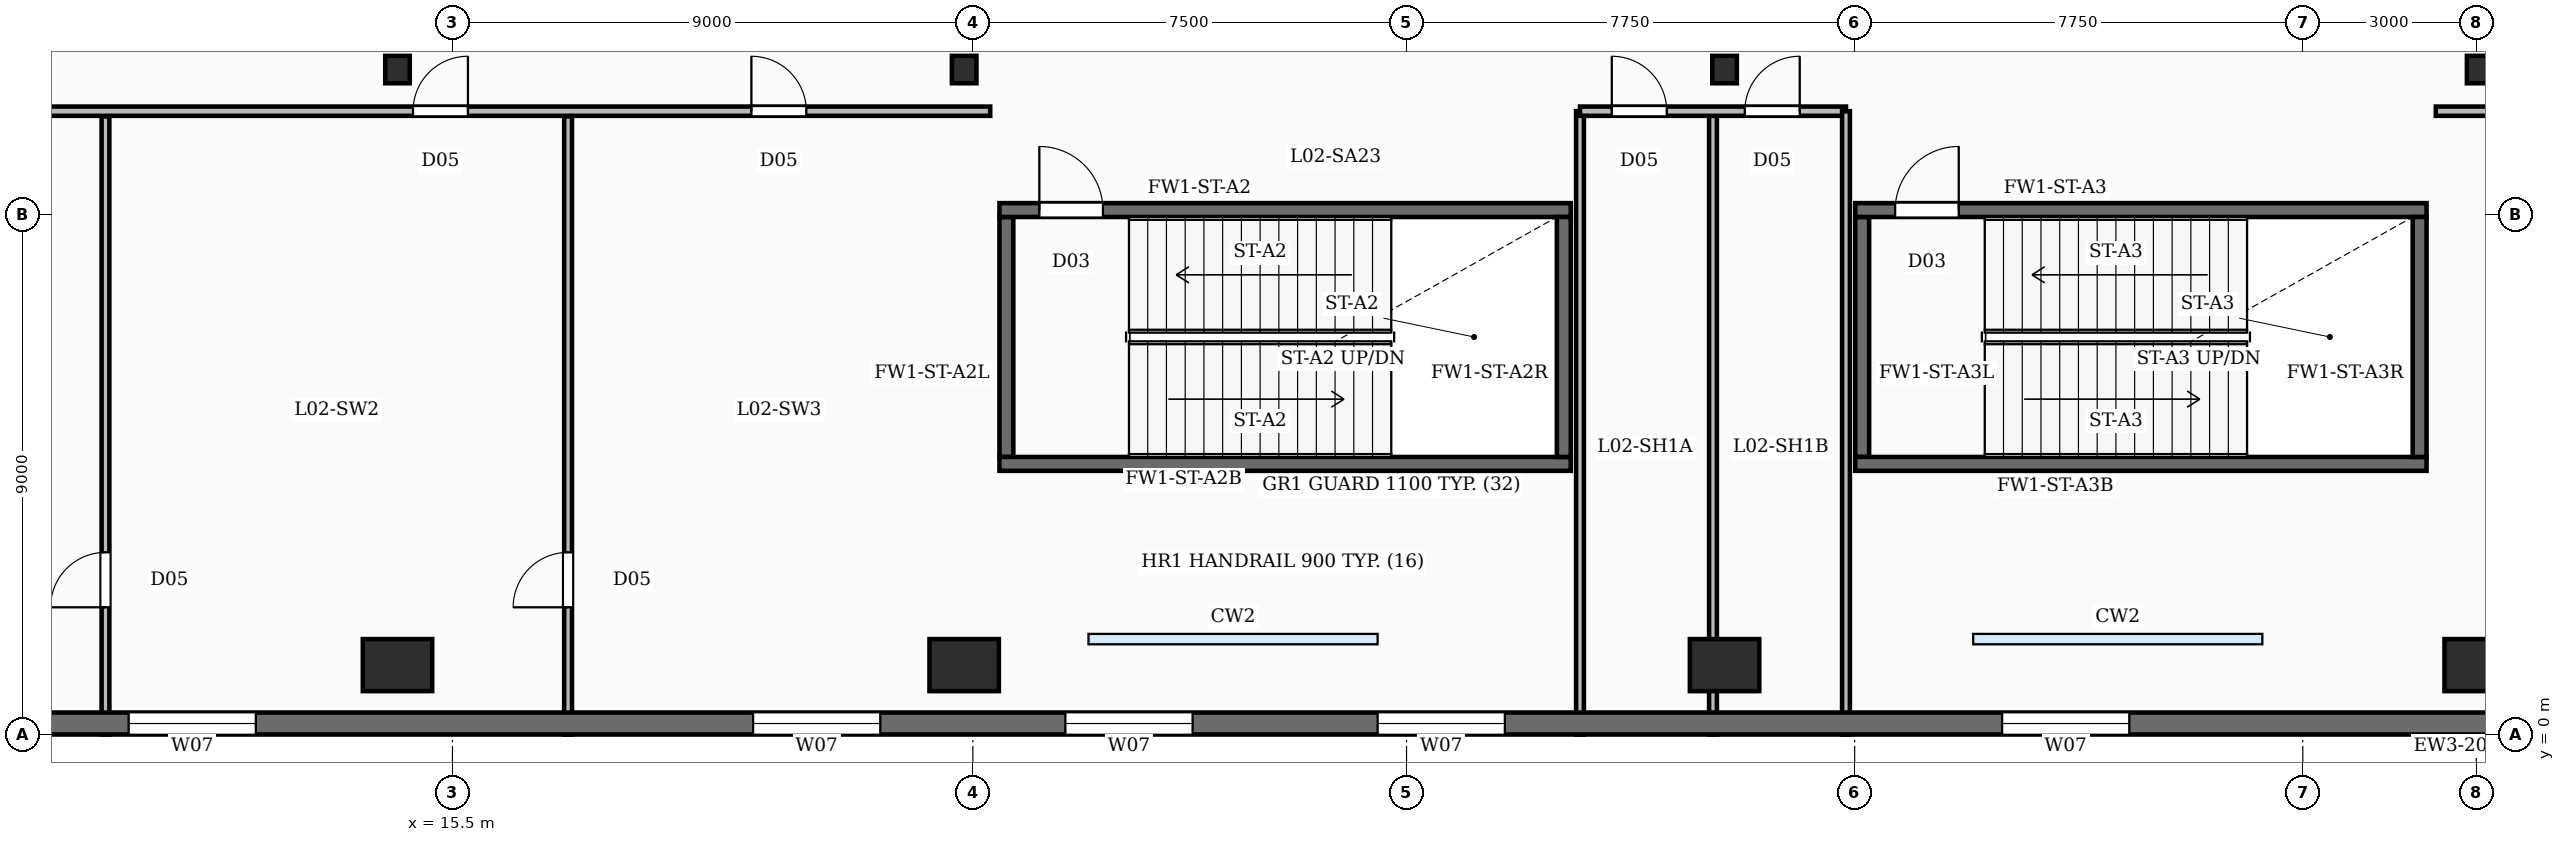
"""IFC4 building model, lengths in metres.
Left out: names, types, materials, properties, quantities, classifications, styles, units other than length and angle.
Written with IfcOpenShell. Run it as: python <this file> out.ifc"""

import sys

from ifc_helpers import new_model, si_unit, direction, frame, frame_2d, origin, origin_2d, place, context, subcontext, project, spatial, rectangle, i_section, extrude, element, fill, save


model = new_model("IFC4")
c1 = context("Model", 3, precision=1e-05, world=origin(), true_north=direction((0.0, 1.0)))
c2 = subcontext(c1, "Body", "Model", "MODEL_VIEW")
j1 = project(units=[si_unit("LENGTHUNIT", "METRE"), si_unit("PLANEANGLEUNIT", "RADIAN")], contexts=[c1])
p1 = place(None, origin())
s1 = spatial("IfcSite", under=j1, at=p1, CompositionType="ELEMENT")
p2 = place(p1, origin())
s2 = spatial("IfcBuilding", under=s1, at=p2, CompositionType="ELEMENT")
p3 = place(p2, frame((0.0, 0.0, 13.0)))
s3 = spatial("IfcBuildingStorey", under=s2, at=p3, CompositionType="ELEMENT", Elevation=13.0)
for number, where, z_axis, x_axis in (
    (1, (14.55, 1.2, -0.35), (0.0, 0.0, 1.0), (1.0, 0.0, 0.0)),
    (2, (24.35, 1.2, -0.35), (0.0, 0.0, 1.0), (1.0, 0.0, 0.0)),
    (3, (37.5, 1.2, -0.35), (0.0, 0.0, 1.0), (1.0, 0.0, 0.0)),
    (4, (50.55, 1.2, -0.35), (0.0, 0.0, 1.0), (1.0, 0.0, 0.0)),
):
    element("IfcColumn", number, at=place(p3, frame(where, z_axis=z_axis, x_axis=x_axis)), inside=s3, PredefinedType="COLUMN", context=c2, shape_type="SweptSolid", body=[
        extrude(rectangle(XDim=1.2, YDim=0.9, at=origin_2d()), origin(), (0.0, 0.0, 1.0), 5.0),
    ])
for number, where, z_axis, x_axis in (
    (5, (14.55, 11.5, -0.35), (0.0, 0.0, 1.0), (1.0, 0.0, 0.0)),
    (6, (24.35, 11.5, -0.35), (0.0, 0.0, 1.0), (1.0, 0.0, 0.0)),
    (7, (37.5, 11.5, -0.35), (0.0, 0.0, 1.0), (1.0, 0.0, 0.0)),
    (8, (50.55, 11.5, -0.35), (0.0, 0.0, 1.0), (1.0, 0.0, 0.0)),
):
    element("IfcColumn", number, at=place(p3, frame(where, z_axis=z_axis, x_axis=x_axis)), inside=s3, PredefinedType="COLUMN", context=c2, shape_type="SweptSolid", body=[
        extrude(i_section(OverallWidth=0.424, OverallDepth=0.474, WebThickness=0.048, FlangeThickness=0.077, FilletRadius=0.02, at=origin_2d()), origin(), (0.0, 0.0, 1.0), 5.0),
    ])
p4 = place(p3, frame((74.1, 0.19, 0.0), z_axis=(0.0, 0.0, 1.0), x_axis=(-1.0, 0.0, 0.0)))
e9 = element("IfcWall", 9, at=p4, inside=s3, PredefinedType="SOLIDWALL", context=c2, shape_type="SweptSolid", body=[
    extrude(rectangle(XDim=68.7, YDim=0.38, at=frame_2d((34.35, 0.0))), origin(), (0.0, 0.0, 1.0), 4.65),
])
p5 = place(p4, frame((2.6, 0.0, 0.95)))
e10 = element("IfcOpeningElement", 10, at=p5, cuts=e9, PredefinedType="OPENING", context=c2, shape_type="SweptSolid", body=[
    extrude(rectangle(XDim=2.2, YDim=2.5, at=frame_2d((1.1, 1.25))), frame((0.0, 0.2, 0.0), z_axis=(0.0, -1.0, 0.0), x_axis=(1.0, 0.0, 0.0)), (0.0, 0.0, 1.0), 0.4),
])
p6 = place(p4, frame((18.8, 0.0, 0.95)))
e11 = element("IfcOpeningElement", 11, at=p6, cuts=e9, PredefinedType="OPENING", context=c2, shape_type="SweptSolid", body=[
    extrude(rectangle(XDim=2.2, YDim=2.5, at=frame_2d((1.1, 1.25))), frame((0.0, 0.2, 0.0), z_axis=(0.0, -1.0, 0.0), x_axis=(1.0, 0.0, 0.0)), (0.0, 0.0, 1.0), 0.4),
])
p7 = place(p4, frame((29.6, 0.0, 0.95)))
e12 = element("IfcOpeningElement", 12, at=p7, cuts=e9, PredefinedType="OPENING", context=c2, shape_type="SweptSolid", body=[
    extrude(rectangle(XDim=2.2, YDim=2.5, at=frame_2d((1.1, 1.25))), frame((0.0, 0.2, 0.0), z_axis=(0.0, -1.0, 0.0), x_axis=(1.0, 0.0, 0.0)), (0.0, 0.0, 1.0), 0.4),
])
p8 = place(p4, frame((40.4, 0.0, 0.95)))
e13 = element("IfcOpeningElement", 13, at=p8, cuts=e9, PredefinedType="OPENING", context=c2, shape_type="SweptSolid", body=[
    extrude(rectangle(XDim=2.2, YDim=2.5, at=frame_2d((1.1, 1.25))), frame((0.0, 0.2, 0.0), z_axis=(0.0, -1.0, 0.0), x_axis=(1.0, 0.0, 0.0)), (0.0, 0.0, 1.0), 0.4),
])
p9 = place(p4, frame((45.8, 0.0, 0.95)))
e14 = element("IfcOpeningElement", 14, at=p9, cuts=e9, PredefinedType="OPENING", context=c2, shape_type="SweptSolid", body=[
    extrude(rectangle(XDim=2.2, YDim=2.5, at=frame_2d((1.1, 1.25))), frame((0.0, 0.2, 0.0), z_axis=(0.0, -1.0, 0.0), x_axis=(1.0, 0.0, 0.0)), (0.0, 0.0, 1.0), 0.4),
])
p10 = place(p4, frame((51.2, 0.0, 0.95)))
e15 = element("IfcOpeningElement", 15, at=p10, cuts=e9, PredefinedType="OPENING", context=c2, shape_type="SweptSolid", body=[
    extrude(rectangle(XDim=2.2, YDim=2.5, at=frame_2d((1.1, 1.25))), frame((0.0, 0.2, 0.0), z_axis=(0.0, -1.0, 0.0), x_axis=(1.0, 0.0, 0.0)), (0.0, 0.0, 1.0), 0.4),
])
p11 = place(p4, frame((62.0, 0.0, 0.95)))
e16 = element("IfcOpeningElement", 16, at=p11, cuts=e9, PredefinedType="OPENING", context=c2, shape_type="SweptSolid", body=[
    extrude(rectangle(XDim=2.2, YDim=2.5, at=frame_2d((1.1, 1.25))), frame((0.0, 0.2, 0.0), z_axis=(0.0, -1.0, 0.0), x_axis=(1.0, 0.0, 0.0)), (0.0, 0.0, 1.0), 0.4),
])
p12 = place(p3, frame((24.96, 9.07, 0.0), z_axis=(0.0, 0.0, 1.0), x_axis=(1.0, 0.0, 0.0)))
e17 = element("IfcWall", 17, at=p12, inside=s3, PredefinedType="SOLIDWALL", context=c2, shape_type="SweptSolid", body=[
    extrude(rectangle(XDim=9.88, YDim=0.24, at=frame_2d((4.94, 0.0))), origin(), (0.0, 0.0, 1.0), 4.65),
])
p13 = place(p12, frame((0.69, 0.0, 0.0)))
e18 = element("IfcOpeningElement", 18, at=p13, cuts=e17, PredefinedType="OPENING", context=c2, shape_type="SweptSolid", body=[
    extrude(rectangle(XDim=1.1, YDim=2.15, at=frame_2d((0.55, 1.075))), frame((0.0, 0.13, 0.0), z_axis=(0.0, -1.0, 0.0), x_axis=(1.0, 0.0, 0.0)), (0.0, 0.0, 1.0), 0.26),
])
p14 = place(p3, frame((24.96, 4.68, 0.0), z_axis=(0.0, 0.0, 1.0), x_axis=(1.0, 0.0, 0.0)))
e19 = element("IfcWall", 19, at=p14, inside=s3, PredefinedType="SOLIDWALL", context=c2, shape_type="SweptSolid", body=[
    extrude(rectangle(XDim=9.88, YDim=0.24, at=frame_2d((4.94, 0.0))), origin(), (0.0, 0.0, 1.0), 4.65),
])
for number, where, z_axis, x_axis in (
    (20, (25.08, 4.8, 0.0), (0.0, 0.0, 1.0), (0.0, 1.0, 0.0)),
    (21, (34.72, 4.8, 0.0), (0.0, 0.0, 1.0), (0.0, 1.0, 0.0)),
):
    element("IfcWall", number, at=place(p3, frame(where, z_axis=z_axis, x_axis=x_axis)), inside=s3, PredefinedType="SOLIDWALL", context=c2, shape_type="SweptSolid", body=[
        extrude(rectangle(XDim=4.15, YDim=0.24, at=frame_2d((2.075, 0.0))), origin(), (0.0, 0.0, 1.0), 4.65),
    ])
p15 = place(p3, frame((39.76, 9.07, 0.0), z_axis=(0.0, 0.0, 1.0), x_axis=(1.0, 0.0, 0.0)))
e22 = element("IfcWall", 22, at=p15, inside=s3, PredefinedType="SOLIDWALL", context=c2, shape_type="SweptSolid", body=[
    extrude(rectangle(XDim=9.88, YDim=0.24, at=frame_2d((4.94, 0.0))), origin(), (0.0, 0.0, 1.0), 4.65),
])
p16 = place(p15, frame((0.69, 0.0, 0.0)))
e23 = element("IfcOpeningElement", 23, at=p16, cuts=e22, PredefinedType="OPENING", context=c2, shape_type="SweptSolid", body=[
    extrude(rectangle(XDim=1.1, YDim=2.15, at=frame_2d((0.55, 1.075))), frame((0.0, 0.13, 0.0), z_axis=(0.0, -1.0, 0.0), x_axis=(1.0, 0.0, 0.0)), (0.0, 0.0, 1.0), 0.26),
])
p17 = place(p3, frame((39.76, 4.68, 0.0), z_axis=(0.0, 0.0, 1.0), x_axis=(1.0, 0.0, 0.0)))
e24 = element("IfcWall", 24, at=p17, inside=s3, PredefinedType="SOLIDWALL", context=c2, shape_type="SweptSolid", body=[
    extrude(rectangle(XDim=9.88, YDim=0.24, at=frame_2d((4.94, 0.0))), origin(), (0.0, 0.0, 1.0), 4.65),
])
for number, where, z_axis, x_axis in (
    (25, (39.88, 4.8, 0.0), (0.0, 0.0, 1.0), (0.0, 1.0, 0.0)),
    (26, (49.52, 4.8, 0.0), (0.0, 0.0, 1.0), (0.0, 1.0, 0.0)),
):
    element("IfcWall", number, at=place(p3, frame(where, z_axis=z_axis, x_axis=x_axis)), inside=s3, PredefinedType="SOLIDWALL", context=c2, shape_type="SweptSolid", body=[
        extrude(rectangle(XDim=4.15, YDim=0.24, at=frame_2d((2.075, 0.0))), origin(), (0.0, 0.0, 1.0), 4.65),
    ])
p18 = place(p3, frame((9.5, 0.0, 0.0), z_axis=(0.0, 0.0, 1.0), x_axis=(0.0, 1.0, 0.0)))
e27 = element("IfcWall", 27, at=p18, inside=s3, PredefinedType="PARTITIONING", context=c2, shape_type="SweptSolid", body=[
    extrude(rectangle(XDim=10.69, YDim=0.135, at=frame_2d((5.345, 0.0))), origin(), (0.0, 0.0, 1.0), 3.71),
])
p19 = place(p18, frame((2.2, 0.0, 0.0)))
e28 = element("IfcOpeningElement", 28, at=p19, cuts=e27, PredefinedType="OPENING", context=c2, shape_type="SweptSolid", body=[
    extrude(rectangle(XDim=0.95, YDim=2.15, at=frame_2d((0.475, 1.075))), frame((0.0, 0.077, 0.0), z_axis=(0.0, -1.0, 0.0), x_axis=(1.0, 0.0, 0.0)), (0.0, 0.0, 1.0), 0.155),
])
p20 = place(p3, frame((17.5, 0.0, 0.0), z_axis=(0.0, 0.0, 1.0), x_axis=(0.0, 1.0, 0.0)))
e29 = element("IfcWall", 29, at=p20, inside=s3, PredefinedType="PARTITIONING", context=c2, shape_type="SweptSolid", body=[
    extrude(rectangle(XDim=10.69, YDim=0.135, at=frame_2d((5.345, 0.0))), origin(), (0.0, 0.0, 1.0), 3.71),
])
p21 = place(p20, frame((2.2, 0.0, 0.0)))
e30 = element("IfcOpeningElement", 30, at=p21, cuts=e29, PredefinedType="OPENING", context=c2, shape_type="SweptSolid", body=[
    extrude(rectangle(XDim=0.95, YDim=2.15, at=frame_2d((0.475, 1.075))), frame((0.0, 0.077, 0.0), z_axis=(0.0, -1.0, 0.0), x_axis=(1.0, 0.0, 0.0)), (0.0, 0.0, 1.0), 0.155),
])
p22 = place(p3, frame((0.0, 10.78, 0.0), z_axis=(0.0, 0.0, 1.0), x_axis=(1.0, 0.0, 0.0)))
e31 = element("IfcWall", 31, at=p22, inside=s3, PredefinedType="PARTITIONING", context=c2, shape_type="SweptSolid", body=[
    extrude(rectangle(XDim=24.8, YDim=0.16, at=frame_2d((12.4, 0.0))), origin(), (0.0, 0.0, 1.0), 3.71),
])
p23 = place(p22, frame((14.818, 0.0, 0.0)))
e32 = element("IfcOpeningElement", 32, at=p23, cuts=e31, PredefinedType="OPENING", context=c2, shape_type="SweptSolid", body=[
    extrude(rectangle(XDim=0.95, YDim=2.15, at=frame_2d((0.475, 1.075))), frame((0.0, 0.09, 0.0), z_axis=(0.0, -1.0, 0.0), x_axis=(1.0, 0.0, 0.0)), (0.0, 0.0, 1.0), 0.18),
])
p24 = place(p22, frame((20.67, 0.0, 0.0)))
e33 = element("IfcOpeningElement", 33, at=p24, cuts=e31, PredefinedType="OPENING", context=c2, shape_type="SweptSolid", body=[
    extrude(rectangle(XDim=0.95, YDim=2.15, at=frame_2d((0.475, 1.075))), frame((0.0, 0.09, 0.0), z_axis=(0.0, -1.0, 0.0), x_axis=(1.0, 0.0, 0.0)), (0.0, 0.0, 1.0), 0.18),
])
p25 = place(p3, frame((49.8, 10.78, 0.0), z_axis=(0.0, 0.0, 1.0), x_axis=(1.0, 0.0, 0.0)))
e34 = element("IfcWall", 34, at=p25, inside=s3, PredefinedType="PARTITIONING", context=c2, shape_type="SweptSolid", body=[
    extrude(rectangle(XDim=29.7, YDim=0.16, at=frame_2d((14.85, 0.0))), origin(), (0.0, 0.0, 1.0), 3.71),
])
p26 = place(p25, frame((3.62, 0.0, 0.0)))
e35 = element("IfcOpeningElement", 35, at=p26, cuts=e34, PredefinedType="OPENING", context=c2, shape_type="SweptSolid", body=[
    extrude(rectangle(XDim=0.95, YDim=2.15, at=frame_2d((0.475, 1.075))), frame((0.0, 0.09, 0.0), z_axis=(0.0, -1.0, 0.0), x_axis=(1.0, 0.0, 0.0)), (0.0, 0.0, 1.0), 0.18),
])
p27 = place(p25, frame((11.97, 0.0, 0.0)))
e36 = element("IfcOpeningElement", 36, at=p27, cuts=e34, PredefinedType="OPENING", context=c2, shape_type="SweptSolid", body=[
    extrude(rectangle(XDim=0.95, YDim=2.15, at=frame_2d((0.475, 1.075))), frame((0.0, 0.09, 0.0), z_axis=(0.0, -1.0, 0.0), x_axis=(1.0, 0.0, 0.0)), (0.0, 0.0, 1.0), 0.18),
])
p28 = place(p25, frame((19.52, 0.0, 0.0)))
e37 = element("IfcOpeningElement", 37, at=p28, cuts=e34, PredefinedType="OPENING", context=c2, shape_type="SweptSolid", body=[
    extrude(rectangle(XDim=0.95, YDim=2.15, at=frame_2d((0.475, 1.075))), frame((0.0, 0.09, 0.0), z_axis=(0.0, -1.0, 0.0), x_axis=(1.0, 0.0, 0.0)), (0.0, 0.0, 1.0), 0.18),
])
p29 = place(p3, frame((35.0, 10.78, 0.0), z_axis=(0.0, 0.0, 1.0), x_axis=(1.0, 0.0, 0.0)))
e38 = element("IfcWall", 38, at=p29, inside=s3, PredefinedType="PARTITIONING", context=c2, shape_type="SweptSolid", body=[
    extrude(rectangle(XDim=4.6, YDim=0.16, at=frame_2d((2.3, 0.0))), origin(), (0.0, 0.0, 1.0), 3.71),
])
p30 = place(p29, frame((0.55, 0.0, 0.0)))
e39 = element("IfcOpeningElement", 39, at=p30, cuts=e38, PredefinedType="OPENING", context=c2, shape_type="SweptSolid", body=[
    extrude(rectangle(XDim=0.95, YDim=2.15, at=frame_2d((0.475, 1.075))), frame((0.0, 0.09, 0.0), z_axis=(0.0, -1.0, 0.0), x_axis=(1.0, 0.0, 0.0)), (0.0, 0.0, 1.0), 0.18),
])
p31 = place(p29, frame((2.85, 0.0, 0.0)))
e40 = element("IfcOpeningElement", 40, at=p31, cuts=e38, PredefinedType="OPENING", context=c2, shape_type="SweptSolid", body=[
    extrude(rectangle(XDim=0.95, YDim=2.15, at=frame_2d((0.475, 1.075))), frame((0.0, 0.09, 0.0), z_axis=(0.0, -1.0, 0.0), x_axis=(1.0, 0.0, 0.0)), (0.0, 0.0, 1.0), 0.18),
])
p32 = place(p3, frame((37.3, 0.0, 0.0), z_axis=(0.0, 0.0, 1.0), x_axis=(0.0, 1.0, 0.0)))
e41 = element("IfcWall", 41, at=p32, inside=s3, PredefinedType="PARTITIONING", context=c2, shape_type="SweptSolid", body=[
    extrude(rectangle(XDim=10.7, YDim=0.135, at=frame_2d((5.35, 0.0))), origin(), (0.0, 0.0, 1.0), 3.71),
])
for number, where, z_axis, x_axis in (
    (42, (35.0, 0.0, 0.0), (0.0, 0.0, 1.0), (0.0, 1.0, 0.0)),
    (43, (39.6, 0.0, 0.0), (0.0, 0.0, 1.0), (0.0, 1.0, 0.0)),
):
    element("IfcWall", number, at=place(p3, frame(where, z_axis=z_axis, x_axis=x_axis)), inside=s3, PredefinedType="PARTITIONING", context=c2, shape_type="SweptSolid", body=[
        extrude(rectangle(XDim=10.78, YDim=0.135, at=frame_2d((5.39, 0.0))), origin(), (0.0, 0.0, 1.0), 3.71),
    ])
p33 = place(p7, origin())
e44 = element("IfcWindow", 44, at=p33, inside=s3, PartitioningType="DOUBLE_PANEL_VERTICAL", PredefinedType="WINDOW", context=c2, shape_type="SweptSolid", body=[
    extrude(rectangle(XDim=2.2, YDim=2.5, at=frame_2d((1.1, 1.25))), frame((0.0, 0.03, 0.0), z_axis=(0.0, -1.0, 0.0), x_axis=(1.0, 0.0, 0.0)), (0.0, 0.0, 1.0), 0.06),
])
fill(e12, e44)
p34 = place(p8, origin())
e45 = element("IfcWindow", 45, at=p34, inside=s3, PartitioningType="DOUBLE_PANEL_VERTICAL", PredefinedType="WINDOW", context=c2, shape_type="SweptSolid", body=[
    extrude(rectangle(XDim=2.2, YDim=2.5, at=frame_2d((1.1, 1.25))), frame((0.0, 0.03, 0.0), z_axis=(0.0, -1.0, 0.0), x_axis=(1.0, 0.0, 0.0)), (0.0, 0.0, 1.0), 0.06),
])
fill(e13, e45)
p35 = place(p9, origin())
e46 = element("IfcWindow", 46, at=p35, inside=s3, PartitioningType="DOUBLE_PANEL_VERTICAL", PredefinedType="WINDOW", context=c2, shape_type="SweptSolid", body=[
    extrude(rectangle(XDim=2.2, YDim=2.5, at=frame_2d((1.1, 1.25))), frame((0.0, 0.03, 0.0), z_axis=(0.0, -1.0, 0.0), x_axis=(1.0, 0.0, 0.0)), (0.0, 0.0, 1.0), 0.06),
])
fill(e14, e46)
p36 = place(p10, origin())
e47 = element("IfcWindow", 47, at=p36, inside=s3, PartitioningType="DOUBLE_PANEL_VERTICAL", PredefinedType="WINDOW", context=c2, shape_type="SweptSolid", body=[
    extrude(rectangle(XDim=2.2, YDim=2.5, at=frame_2d((1.1, 1.25))), frame((0.0, 0.03, 0.0), z_axis=(0.0, -1.0, 0.0), x_axis=(1.0, 0.0, 0.0)), (0.0, 0.0, 1.0), 0.06),
])
fill(e15, e47)
p37 = place(p11, origin())
e48 = element("IfcWindow", 48, at=p37, inside=s3, PartitioningType="DOUBLE_PANEL_VERTICAL", PredefinedType="WINDOW", context=c2, shape_type="SweptSolid", body=[
    extrude(rectangle(XDim=2.2, YDim=2.5, at=frame_2d((1.1, 1.25))), frame((0.0, 0.03, 0.0), z_axis=(0.0, -1.0, 0.0), x_axis=(1.0, 0.0, 0.0)), (0.0, 0.0, 1.0), 0.06),
])
fill(e16, e48)
p38 = place(p13, origin())
e49 = element("IfcDoor", 49, at=p38, inside=s3, OperationType="SINGLE_SWING_LEFT", PredefinedType="DOOR", context=c2, shape_type="SweptSolid", body=[
    extrude(rectangle(XDim=1.1, YDim=2.15, at=frame_2d((0.55, 1.075))), frame((0.0, 0.025, 0.0), z_axis=(0.0, -1.0, 0.0), x_axis=(1.0, 0.0, 0.0)), (0.0, 0.0, 1.0), 0.05),
])
fill(e18, e49)
p39 = place(p16, origin())
e50 = element("IfcDoor", 50, at=p39, inside=s3, OperationType="SINGLE_SWING_RIGHT", PredefinedType="DOOR", context=c2, shape_type="SweptSolid", body=[
    extrude(rectangle(XDim=1.1, YDim=2.15, at=frame_2d((0.55, 1.075))), frame((0.0, 0.025, 0.0), z_axis=(0.0, -1.0, 0.0), x_axis=(1.0, 0.0, 0.0)), (0.0, 0.0, 1.0), 0.05),
])
fill(e23, e50)
p40 = place(p19, origin())
e51 = element("IfcDoor", 51, at=p40, inside=s3, OperationType="SINGLE_SWING_LEFT", PredefinedType="DOOR", context=c2, shape_type="SweptSolid", body=[
    extrude(rectangle(XDim=0.95, YDim=2.15, at=frame_2d((0.475, 1.075))), frame((0.0, 0.025, 0.0), z_axis=(0.0, -1.0, 0.0), x_axis=(1.0, 0.0, 0.0)), (0.0, 0.0, 1.0), 0.05),
])
fill(e28, e51)
p41 = place(p21, origin())
e52 = element("IfcDoor", 52, at=p41, inside=s3, OperationType="SINGLE_SWING_LEFT", PredefinedType="DOOR", context=c2, shape_type="SweptSolid", body=[
    extrude(rectangle(XDim=0.95, YDim=2.15, at=frame_2d((0.475, 1.075))), frame((0.0, 0.025, 0.0), z_axis=(0.0, -1.0, 0.0), x_axis=(1.0, 0.0, 0.0)), (0.0, 0.0, 1.0), 0.05),
])
fill(e30, e52)
p42 = place(p23, origin())
e53 = element("IfcDoor", 53, at=p42, inside=s3, OperationType="SINGLE_SWING_RIGHT", PredefinedType="DOOR", context=c2, shape_type="SweptSolid", body=[
    extrude(rectangle(XDim=0.95, YDim=2.15, at=frame_2d((0.475, 1.075))), frame((0.0, 0.025, 0.0), z_axis=(0.0, -1.0, 0.0), x_axis=(1.0, 0.0, 0.0)), (0.0, 0.0, 1.0), 0.05),
])
fill(e32, e53)
p43 = place(p24, origin())
e54 = element("IfcDoor", 54, at=p43, inside=s3, OperationType="SINGLE_SWING_LEFT", PredefinedType="DOOR", context=c2, shape_type="SweptSolid", body=[
    extrude(rectangle(XDim=0.95, YDim=2.15, at=frame_2d((0.475, 1.075))), frame((0.0, 0.025, 0.0), z_axis=(0.0, -1.0, 0.0), x_axis=(1.0, 0.0, 0.0)), (0.0, 0.0, 1.0), 0.05),
])
fill(e33, e54)
p44 = place(p30, origin())
e55 = element("IfcDoor", 55, at=p44, inside=s3, OperationType="SINGLE_SWING_LEFT", PredefinedType="DOOR", context=c2, shape_type="SweptSolid", body=[
    extrude(rectangle(XDim=0.95, YDim=2.15, at=frame_2d((0.475, 1.075))), frame((0.0, 0.025, 0.0), z_axis=(0.0, -1.0, 0.0), x_axis=(1.0, 0.0, 0.0)), (0.0, 0.0, 1.0), 0.05),
])
fill(e39, e55)
p45 = place(p31, origin())
e56 = element("IfcDoor", 56, at=p45, inside=s3, OperationType="SINGLE_SWING_RIGHT", PredefinedType="DOOR", context=c2, shape_type="SweptSolid", body=[
    extrude(rectangle(XDim=0.95, YDim=2.15, at=frame_2d((0.475, 1.075))), frame((0.0, 0.025, 0.0), z_axis=(0.0, -1.0, 0.0), x_axis=(1.0, 0.0, 0.0)), (0.0, 0.0, 1.0), 0.05),
])
fill(e40, e56)
save(model, sys.argv[1])
